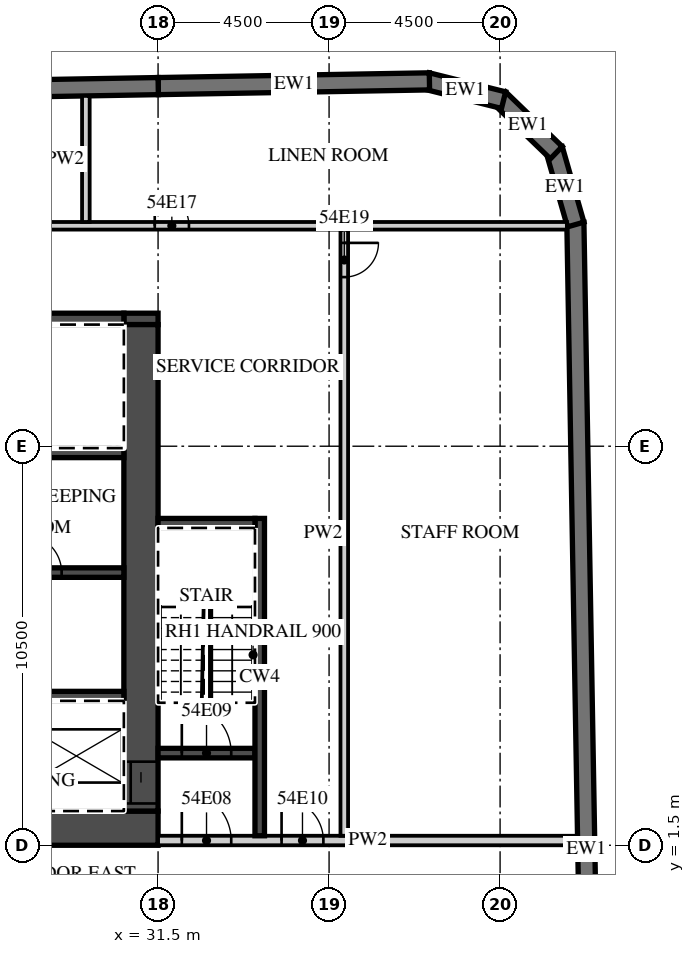
"""IFC4 building model, lengths in metres.
Left out: names, types, materials, properties, quantities, classifications, styles, units other than length and angle.
Written with IfcOpenShell. Run it as: python <this file> out.ifc"""

import sys

from ifc_helpers import new_model, si_unit, direction, frame, frame_2d, origin, place, context, subcontext, project, spatial, polyline, rectangle, outline, extrude, element, fill, save


model = new_model("IFC4")
c1 = context("Model", 3, precision=1e-05, world=origin(), true_north=direction((0.0, 1.0)))
c2 = subcontext(c1, "Body", "Model", "MODEL_VIEW")
j1 = project(units=[si_unit("LENGTHUNIT", "METRE"), si_unit("PLANEANGLEUNIT", "RADIAN")], contexts=[c1])
p1 = place(None, origin())
s1 = spatial("IfcSite", under=j1, at=p1, CompositionType="ELEMENT")
p2 = place(p1, origin())
s2 = spatial("IfcBuilding", under=s1, at=p2, CompositionType="ELEMENT")
p3 = place(p2, frame((0.0, 0.0, 224.3)))
s3 = spatial("IfcBuildingStorey", under=s2, at=p3, CompositionType="ELEMENT", Elevation=224.3)
p4 = place(p3, frame((43.057, -15.103, 0.0), z_axis=(0.0, 0.0, 1.0), x_axis=(-0.017452408953, 0.999847695112, 0.0)))
e1 = element("IfcWall", 1, at=p4, inside=s3, PredefinedType="SOLIDWALL", context=c2, shape_type="SweptSolid", body=[
    extrude(rectangle(XDim=33.0, YDim=0.45, at=frame_2d((16.5, 0.0))), origin(), (0.0, 0.0, 1.0), 3.02),
])
p5 = place(p3, frame((42.49, 17.833, 0.0), z_axis=(0.0, 0.0, 1.0), x_axis=(-0.275546368831, 0.961287781377, 0.0)))
e2 = element("IfcWall", 2, at=p5, inside=s3, PredefinedType="SOLIDWALL", context=c2, shape_type="SweptSolid", body=[
    extrude(outline(polyline([(0.0, -0.225), (2.071, -0.225), (1.95, 0.225), (0.121, 0.225), (0.0, -0.225)])), origin(), (0.0, 0.0, 1.0), 3.02),
])
p6 = place(p3, frame((41.979, 19.724, 0.0), z_axis=(0.0, 0.0, 1.0), x_axis=(-0.719379111448, 0.694617660308, 0.0)))
e3 = element("IfcWall", 3, at=p6, inside=s3, PredefinedType="SOLIDWALL", context=c2, shape_type="SweptSolid", body=[
    extrude(outline(polyline([(0.0, -0.225), (2.071, -0.225), (1.95, 0.225), (0.121, 0.225), (0.0, -0.225)])), origin(), (0.0, 0.0, 1.0), 3.02),
])
p7 = place(p3, frame((40.591, 21.106, 0.0), z_axis=(0.0, 0.0, 1.0), x_axis=(-0.970287979719, 0.241952963225, 0.0)))
e4 = element("IfcWall", 4, at=p7, inside=s3, PredefinedType="SOLIDWALL", context=c2, shape_type="SweptSolid", body=[
    extrude(outline(polyline([(0.0, -0.225), (2.071, -0.225), (1.95, 0.225), (0.121, 0.225), (0.0, -0.225)])), origin(), (0.0, 0.0, 1.0), 3.02),
])
p8 = place(p3, frame((38.641, 21.6, 0.0), z_axis=(0.0, 0.0, 1.0), x_axis=(-0.999847245074, -0.017478172627, 0.0)))
e5 = element("IfcWall", 5, at=p8, inside=s3, PredefinedType="SOLIDWALL", context=c2, shape_type="SweptSolid", body=[
    extrude(rectangle(XDim=7.138, YDim=0.45, at=frame_2d((3.569, 0.0))), origin(), (0.0, 0.0, 1.0), 3.02),
])
p9 = place(p3, frame((31.504, 21.476, 0.0), z_axis=(0.0, 0.0, 1.0), x_axis=(-0.999847677887, -0.017453395744, 0.0)))
e6 = element("IfcWall", 6, at=p9, inside=s3, PredefinedType="SOLIDWALL", context=c2, shape_type="SweptSolid", body=[
    extrude(rectangle(XDim=18.003, YDim=0.45, at=frame_2d((9.001, 0.0))), origin(), (0.0, 0.0, 1.0), 3.02),
])
p10 = place(p3, frame((13.5, 1.95, 0.0), z_axis=(0.0, 0.0, 1.0), x_axis=(1.0, 0.0, 0.0)))
e7 = element("IfcWall", 7, at=p10, inside=s3, PredefinedType="SHEAR", context=c2, shape_type="SweptSolid", body=[
    extrude(rectangle(XDim=18.0, YDim=0.9, at=frame_2d((9.0, 0.0))), origin(), (0.0, 0.0, 1.0), 3.02),
])
p11 = place(p10, frame((1.475, 0.0, 0.0)))
e8 = element("IfcOpeningElement", 8, at=p11, cuts=e7, PredefinedType="OPENING", context=c2, shape_type="SweptSolid", body=[
    extrude(rectangle(XDim=1.8, YDim=2.1, at=frame_2d((0.9, 1.05))), frame((0.0, 0.46, 0.0), z_axis=(0.0, -1.0, 0.0), x_axis=(1.0, 0.0, 0.0)), (0.0, 0.0, 1.0), 0.92),
])
p12 = place(p3, frame((30.6, 15.35, 0.0), z_axis=(0.0, 0.0, 1.0), x_axis=(1.0, 0.0, 0.0)))
e9 = element("IfcWall", 9, at=p12, inside=s3, PredefinedType="SHEAR", context=c2, shape_type="SweptSolid", body=[
    extrude(rectangle(XDim=0.9, YDim=0.3, at=frame_2d((0.45, 0.0))), origin(), (0.0, 0.0, 1.0), 3.02),
])
p13 = place(p3, frame((20.3, 15.35, 0.0), z_axis=(0.0, 0.0, 1.0), x_axis=(1.0, 0.0, 0.0)))
e10 = element("IfcWall", 10, at=p13, inside=s3, PredefinedType="SHEAR", context=c2, shape_type="SweptSolid", body=[
    extrude(rectangle(XDim=10.3, YDim=0.3, at=frame_2d((5.15, 0.0))), origin(), (0.0, 0.0, 1.0), 3.02),
])
p14 = place(p13, frame((4.0, 0.0, 0.0)))
e11 = element("IfcOpeningElement", 11, at=p14, cuts=e10, PredefinedType="OPENING", context=c2, shape_type="SweptSolid", body=[
    extrude(rectangle(XDim=1.3, YDim=2.1, at=frame_2d((0.65, 1.05))), frame((0.0, 0.16, 0.0), z_axis=(0.0, -1.0, 0.0), x_axis=(1.0, 0.0, 0.0)), (0.0, 0.0, 1.0), 0.32),
])
p15 = place(p13, frame((2.562, 0.0, 0.0)))
e12 = element("IfcOpeningElement", 12, at=p15, cuts=e10, PredefinedType="OPENING", context=c2, shape_type="SweptSolid", body=[
    extrude(rectangle(XDim=0.9, YDim=2.1, at=frame_2d((0.45, 1.05))), frame((0.0, 0.16, 0.0), z_axis=(0.0, -1.0, 0.0), x_axis=(1.0, 0.0, 0.0)), (0.0, 0.0, 1.0), 0.32),
])
p16 = place(p13, frame((0.738, 0.0, 0.0)))
e13 = element("IfcOpeningElement", 13, at=p16, cuts=e10, PredefinedType="OPENING", context=c2, shape_type="SweptSolid", body=[
    extrude(rectangle(XDim=0.9, YDim=2.1, at=frame_2d((0.45, 1.05))), frame((0.0, 0.16, 0.0), z_axis=(0.0, -1.0, 0.0), x_axis=(1.0, 0.0, 0.0)), (0.0, 0.0, 1.0), 0.32),
])
p17 = place(p3, frame((31.05, 2.4, 0.0), z_axis=(0.0, 0.0, 1.0), x_axis=(0.0, 1.0, 0.0)))
e14 = element("IfcWall", 14, at=p17, inside=s3, PredefinedType="SHEAR", context=c2, shape_type="SweptSolid", body=[
    extrude(rectangle(XDim=12.8, YDim=0.9, at=frame_2d((6.4, 0.0))), origin(), (0.0, 0.0, 1.0), 3.02),
])
p18 = place(p17, frame((0.2, 0.0, 0.0)))
e15 = element("IfcOpeningElement", 15, at=p18, cuts=e14, PredefinedType="OPENING", context=c2, shape_type="SweptSolid", body=[
    extrude(rectangle(XDim=1.1, YDim=2.1, at=frame_2d((0.55, 1.05))), frame((0.0, 0.46, 0.0), z_axis=(0.0, -1.0, 0.0), x_axis=(1.0, 0.0, 0.0)), (0.0, 0.0, 1.0), 0.92),
])
p19 = place(p3, frame((17.6, 5.425, 0.0), z_axis=(0.0, 0.0, 1.0), x_axis=(1.0, 0.0, 0.0)))
e16 = element("IfcWall", 16, at=p19, inside=s3, PredefinedType="SHEAR", context=c2, shape_type="SweptSolid", body=[
    extrude(rectangle(XDim=13.0, YDim=0.25, at=frame_2d((6.5, 0.0))), origin(), (0.0, 0.0, 1.0), 3.02),
])
p20 = place(p19, frame((8.475, 0.0, 0.0)))
e17 = element("IfcOpeningElement", 17, at=p20, cuts=e16, PredefinedType="OPENING", context=c2, shape_type="SweptSolid", body=[
    extrude(rectangle(XDim=1.2, YDim=2.1, at=frame_2d((0.6, 1.05))), frame((0.0, 0.135, 0.0), z_axis=(0.0, -1.0, 0.0), x_axis=(1.0, 0.0, 0.0)), (0.0, 0.0, 1.0), 0.27),
])
p21 = place(p19, frame((5.875, 0.0, 0.0)))
e18 = element("IfcOpeningElement", 18, at=p21, cuts=e16, PredefinedType="OPENING", context=c2, shape_type="SweptSolid", body=[
    extrude(rectangle(XDim=1.2, YDim=2.1, at=frame_2d((0.6, 1.05))), frame((0.0, 0.135, 0.0), z_axis=(0.0, -1.0, 0.0), x_axis=(1.0, 0.0, 0.0)), (0.0, 0.0, 1.0), 0.27),
])
p22 = place(p3, frame((14.4, 8.675, 0.0), z_axis=(0.0, 0.0, 1.0), x_axis=(1.0, 0.0, 0.0)))
e19 = element("IfcWall", 19, at=p22, inside=s3, PredefinedType="SHEAR", context=c2, shape_type="SweptSolid", body=[
    extrude(rectangle(XDim=16.2, YDim=0.25, at=frame_2d((8.1, 0.0))), origin(), (0.0, 0.0, 1.0), 3.02),
])
p23 = place(p22, frame((6.45, 0.0, 0.0)))
e20 = element("IfcOpeningElement", 20, at=p23, cuts=e19, PredefinedType="OPENING", context=c2, shape_type="SweptSolid", body=[
    extrude(rectangle(XDim=1.2, YDim=2.1, at=frame_2d((0.6, 1.05))), frame((0.0, 0.135, 0.0), z_axis=(0.0, -1.0, 0.0), x_axis=(1.0, 0.0, 0.0)), (0.0, 0.0, 1.0), 0.27),
])
p24 = place(p22, frame((3.8, 0.0, 0.0)))
e21 = element("IfcOpeningElement", 21, at=p24, cuts=e19, PredefinedType="OPENING", context=c2, shape_type="SweptSolid", body=[
    extrude(rectangle(XDim=1.2, YDim=2.1, at=frame_2d((0.6, 1.05))), frame((0.0, 0.135, 0.0), z_axis=(0.0, -1.0, 0.0), x_axis=(1.0, 0.0, 0.0)), (0.0, 0.0, 1.0), 0.27),
])
p25 = place(p22, frame((0.65, 0.0, 0.0)))
e22 = element("IfcOpeningElement", 22, at=p25, cuts=e19, PredefinedType="OPENING", context=c2, shape_type="SweptSolid", body=[
    extrude(rectangle(XDim=1.3, YDim=2.1, at=frame_2d((0.65, 1.05))), frame((0.0, 0.135, 0.0), z_axis=(0.0, -1.0, 0.0), x_axis=(1.0, 0.0, 0.0)), (0.0, 0.0, 1.0), 0.27),
])
p26 = place(p22, frame((13.562, 0.0, 0.0)))
e23 = element("IfcOpeningElement", 23, at=p26, cuts=e19, PredefinedType="OPENING", context=c2, shape_type="SweptSolid", body=[
    extrude(rectangle(XDim=1.0, YDim=2.1, at=frame_2d((0.5, 1.05))), frame((0.0, 0.135, 0.0), z_axis=(0.0, -1.0, 0.0), x_axis=(1.0, 0.0, 0.0)), (0.0, 0.0, 1.0), 0.27),
])
p27 = place(p22, frame((9.587, 0.0, 0.0)))
e24 = element("IfcOpeningElement", 24, at=p27, cuts=e19, PredefinedType="OPENING", context=c2, shape_type="SweptSolid", body=[
    extrude(rectangle(XDim=1.0, YDim=2.1, at=frame_2d((0.5, 1.05))), frame((0.0, 0.135, 0.0), z_axis=(0.0, -1.0, 0.0), x_axis=(1.0, 0.0, 0.0)), (0.0, 0.0, 1.0), 0.27),
])
p28 = place(p3, frame((17.35, 11.825, 0.0), z_axis=(0.0, 0.0, 1.0), x_axis=(1.0, 0.0, 0.0)))
e25 = element("IfcWall", 25, at=p28, inside=s3, PredefinedType="SHEAR", context=c2, shape_type="SweptSolid", body=[
    extrude(rectangle(XDim=13.25, YDim=0.25, at=frame_2d((6.625, 0.0))), origin(), (0.0, 0.0, 1.0), 3.02),
])
p29 = place(p3, frame((31.5, 1.625, 0.0), z_axis=(0.0, 0.0, 1.0), x_axis=(1.0, 0.0, 0.0)))
e26 = element("IfcWall", 26, at=p29, inside=s3, PredefinedType="PARTITIONING", context=c2, shape_type="SweptSolid", body=[
    extrude(rectangle(XDim=11.04, YDim=0.25, at=frame_2d((5.52, 0.0))), origin(), (0.0, 0.0, 1.0), 3.02),
])
p30 = place(p29, frame((0.625, 0.0, 0.0)))
e27 = element("IfcOpeningElement", 27, at=p30, cuts=e26, PredefinedType="OPENING", context=c2, shape_type="SweptSolid", body=[
    extrude(rectangle(XDim=1.3, YDim=2.1, at=frame_2d((0.65, 1.05))), frame((0.0, 0.135, 0.0), z_axis=(0.0, -1.0, 0.0), x_axis=(1.0, 0.0, 0.0)), (0.0, 0.0, 1.0), 0.27),
])
p31 = place(p29, frame((3.25, 0.0, 0.0)))
e28 = element("IfcOpeningElement", 28, at=p31, cuts=e26, PredefinedType="OPENING", context=c2, shape_type="SweptSolid", body=[
    extrude(rectangle(XDim=1.1, YDim=2.1, at=frame_2d((0.55, 1.05))), frame((0.0, 0.135, 0.0), z_axis=(0.0, -1.0, 0.0), x_axis=(1.0, 0.0, 0.0)), (0.0, 0.0, 1.0), 0.27),
])
p32 = place(p3, frame((31.5, 3.925, 0.0), z_axis=(0.0, 0.0, 1.0), x_axis=(1.0, 0.0, 0.0)))
e29 = element("IfcWall", 29, at=p32, inside=s3, PredefinedType="SHEAR", context=c2, shape_type="SweptSolid", body=[
    extrude(rectangle(XDim=2.55, YDim=0.25, at=frame_2d((1.275, 0.0))), origin(), (0.0, 0.0, 1.0), 3.02),
])
p33 = place(p32, frame((0.625, 0.0, 0.0)))
e30 = element("IfcOpeningElement", 30, at=p33, cuts=e29, PredefinedType="OPENING", context=c2, shape_type="SweptSolid", body=[
    extrude(rectangle(XDim=1.3, YDim=2.1, at=frame_2d((0.65, 1.05))), frame((0.0, 0.135, 0.0), z_axis=(0.0, -1.0, 0.0), x_axis=(1.0, 0.0, 0.0)), (0.0, 0.0, 1.0), 0.27),
])
p34 = place(p3, frame((34.175, 1.75, 0.0), z_axis=(0.0, 0.0, 1.0), x_axis=(0.0, 1.0, 0.0)))
e31 = element("IfcWall", 31, at=p34, inside=s3, PredefinedType="SHEAR", context=c2, shape_type="SweptSolid", body=[
    extrude(rectangle(XDim=8.35, YDim=0.25, at=frame_2d((4.175, 0.0))), origin(), (0.0, 0.0, 1.0), 3.02),
])
p35 = place(p3, frame((31.5, 9.975, 0.0), z_axis=(0.0, 0.0, 1.0), x_axis=(1.0, 0.0, 0.0)))
e32 = element("IfcWall", 32, at=p35, inside=s3, PredefinedType="SHEAR", context=c2, shape_type="SweptSolid", body=[
    extrude(rectangle(XDim=2.55, YDim=0.25, at=frame_2d((1.275, 0.0))), origin(), (0.0, 0.0, 1.0), 3.02),
])
p36 = place(p3, frame((36.4, 1.75, 0.0), z_axis=(0.0, 0.0, 1.0), x_axis=(0.0, 1.0, 0.0)))
e33 = element("IfcWall", 33, at=p36, inside=s3, PredefinedType="PARTITIONING", context=c2, shape_type="SweptSolid", body=[
    extrude(rectangle(XDim=15.95, YDim=0.2, at=frame_2d((7.975, 0.0))), origin(), (0.0, 0.0, 1.0), 3.02),
])
p37 = place(p36, frame((14.7, 0.0, 0.0)))
e34 = element("IfcOpeningElement", 34, at=p37, cuts=e33, PredefinedType="OPENING", context=c2, shape_type="SweptSolid", body=[
    extrude(rectangle(XDim=0.9, YDim=2.1, at=frame_2d((0.45, 1.05))), frame((0.0, 0.11, 0.0), z_axis=(0.0, -1.0, 0.0), x_axis=(1.0, 0.0, 0.0)), (0.0, 0.0, 1.0), 0.22),
])
p38 = place(p3, frame((13.6, 17.8, 0.0), z_axis=(0.0, 0.0, 1.0), x_axis=(1.0, 0.0, 0.0)))
e35 = element("IfcWall", 35, at=p38, inside=s3, PredefinedType="PARTITIONING", context=c2, shape_type="SweptSolid", body=[
    extrude(rectangle(XDim=28.657, YDim=0.2, at=frame_2d((14.329, 0.0))), origin(), (0.0, 0.0, 1.0), 3.02),
])
p39 = place(p38, frame((17.812, 0.0, 0.0)))
e36 = element("IfcOpeningElement", 36, at=p39, cuts=e35, PredefinedType="OPENING", context=c2, shape_type="SweptSolid", body=[
    extrude(rectangle(XDim=0.9, YDim=2.1, at=frame_2d((0.45, 1.05))), frame((0.0, 0.11, 0.0), z_axis=(0.0, -1.0, 0.0), x_axis=(1.0, 0.0, 0.0)), (0.0, 0.0, 1.0), 0.22),
])
p40 = place(p38, frame((9.512, 0.0, 0.0)))
e37 = element("IfcOpeningElement", 37, at=p40, cuts=e35, PredefinedType="OPENING", context=c2, shape_type="SweptSolid", body=[
    extrude(rectangle(XDim=0.9, YDim=2.1, at=frame_2d((0.45, 1.05))), frame((0.0, 0.11, 0.0), z_axis=(0.0, -1.0, 0.0), x_axis=(1.0, 0.0, 0.0)), (0.0, 0.0, 1.0), 0.22),
])
p41 = place(p3, frame((29.6, 17.9, 0.0), z_axis=(0.0, 0.0, 1.0), x_axis=(0.0, 1.0, 0.0)))
e38 = element("IfcWall", 38, at=p41, inside=s3, PredefinedType="PARTITIONING", context=c2, shape_type="SweptSolid", body=[
    extrude(rectangle(XDim=3.318, YDim=0.2, at=frame_2d((1.659, 0.0))), origin(), (0.0, 0.0, 1.0), 3.02),
])
p42 = place(p18, origin())
e39 = element("IfcDoor", 39, at=p42, inside=s3, OperationType="SLIDING_TO_LEFT", PredefinedType="DOOR", context=c2, shape_type="SweptSolid", body=[
    extrude(rectangle(XDim=1.1, YDim=2.1, at=frame_2d((0.55, 1.05))), frame((0.0, 0.025, 0.0), z_axis=(0.0, -1.0, 0.0), x_axis=(1.0, 0.0, 0.0)), (0.0, 0.0, 1.0), 0.05),
])
fill(e15, e39)
p43 = place(p30, origin())
e40 = element("IfcDoor", 40, at=p43, inside=s3, OperationType="SINGLE_SWING_LEFT", PredefinedType="DOOR", context=c2, shape_type="SweptSolid", body=[
    extrude(rectangle(XDim=1.3, YDim=2.1, at=frame_2d((0.65, 1.05))), frame((0.0, 0.025, 0.0), z_axis=(0.0, -1.0, 0.0), x_axis=(1.0, 0.0, 0.0)), (0.0, 0.0, 1.0), 0.05),
])
fill(e27, e40)
p44 = place(p33, origin())
e41 = element("IfcDoor", 41, at=p44, inside=s3, OperationType="SINGLE_SWING_LEFT", PredefinedType="DOOR", context=c2, shape_type="SweptSolid", body=[
    extrude(rectangle(XDim=1.3, YDim=2.1, at=frame_2d((0.65, 1.05))), frame((0.0, 0.025, 0.0), z_axis=(0.0, -1.0, 0.0), x_axis=(1.0, 0.0, 0.0)), (0.0, 0.0, 1.0), 0.05),
])
fill(e30, e41)
p45 = place(p31, origin())
e42 = element("IfcDoor", 42, at=p45, inside=s3, OperationType="SINGLE_SWING_LEFT", PredefinedType="DOOR", context=c2, shape_type="SweptSolid", body=[
    extrude(rectangle(XDim=1.1, YDim=2.1, at=frame_2d((0.55, 1.05))), frame((0.0, 0.025, 0.0), z_axis=(0.0, -1.0, 0.0), x_axis=(1.0, 0.0, 0.0)), (0.0, 0.0, 1.0), 0.05),
])
fill(e28, e42)
p46 = place(p26, origin())
e43 = element("IfcDoor", 43, at=p46, inside=s3, OperationType="SINGLE_SWING_LEFT", PredefinedType="DOOR", context=c2, shape_type="SweptSolid", body=[
    extrude(rectangle(XDim=1.0, YDim=2.1, at=frame_2d((0.5, 1.05))), frame((0.0, 0.025, 0.0), z_axis=(0.0, -1.0, 0.0), x_axis=(1.0, 0.0, 0.0)), (0.0, 0.0, 1.0), 0.05),
])
fill(e23, e43)
p47 = place(p39, origin())
e44 = element("IfcDoor", 44, at=p47, inside=s3, OperationType="SINGLE_SWING_LEFT", PredefinedType="DOOR", context=c2, shape_type="SweptSolid", body=[
    extrude(rectangle(XDim=0.9, YDim=2.1, at=frame_2d((0.45, 1.05))), frame((0.0, 0.025, 0.0), z_axis=(0.0, -1.0, 0.0), x_axis=(1.0, 0.0, 0.0)), (0.0, 0.0, 1.0), 0.05),
])
fill(e36, e44)
p48 = place(p37, origin())
e45 = element("IfcDoor", 45, at=p48, inside=s3, OperationType="SINGLE_SWING_RIGHT", PredefinedType="DOOR", context=c2, shape_type="SweptSolid", body=[
    extrude(rectangle(XDim=0.9, YDim=2.1, at=frame_2d((0.45, 1.05))), frame((0.0, 0.025, 0.0), z_axis=(0.0, -1.0, 0.0), x_axis=(1.0, 0.0, 0.0)), (0.0, 0.0, 1.0), 0.05),
])
fill(e34, e45)
save(model, sys.argv[1])
